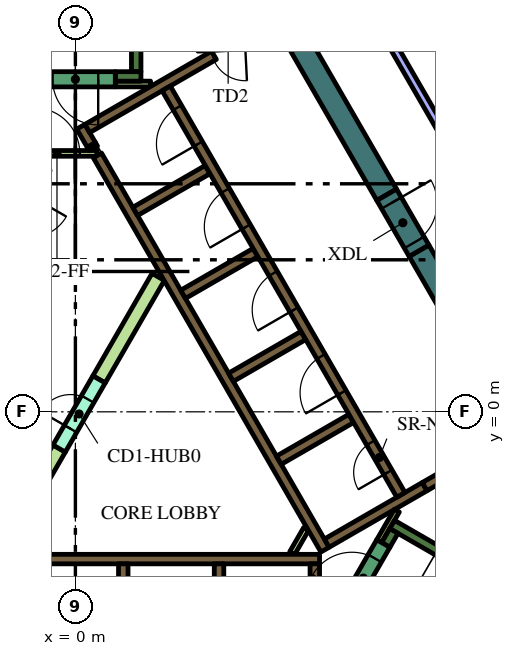
"""IFC4 building model, lengths in metres.
Left out: names, types, materials, properties, quantities, classifications, styles, units other than length and angle.
Written with IfcOpenShell. Run it as: python <this file> out.ifc"""

import sys

from ifc_helpers import new_model, si_unit, direction, frame, frame_2d, origin, place, context, subcontext, project, spatial, polyline, rectangle, outline, extrude, element, fill, save


model = new_model("IFC4")
c1 = context("Model", 3, precision=1e-05, world=origin(), true_north=direction((0.0, 1.0)))
c2 = subcontext(c1, "Body", "Model", "MODEL_VIEW")
j1 = project(units=[si_unit("LENGTHUNIT", "METRE"), si_unit("PLANEANGLEUNIT", "RADIAN")], contexts=[c1])
p1 = place(None, origin())
s1 = spatial("IfcSite", under=j1, at=p1, CompositionType="ELEMENT")
p2 = place(p1, origin())
s2 = spatial("IfcBuilding", under=s1, at=p2, CompositionType="ELEMENT")
p3 = place(p2, frame((0.0, 0.0, 267.0)))
s3 = spatial("IfcBuildingStorey", under=s2, at=p3, CompositionType="ELEMENT", Elevation=267.0)
p4 = place(p3, frame((9.042, 4.239, 0.0), z_axis=(0.0, 0.0, 1.0), x_axis=(0.500005785455, -0.866022063525, 0.0)))
e1 = element("IfcWall", 1, at=p4, inside=s3, PredefinedType="SOLIDWALL", context=c2, shape_type="SweptSolid", body=[
    extrude(rectangle(XDim=12.406, YDim=0.6, at=frame_2d((6.203, 0.0))), origin(), (0.0, 0.0, 1.0), 4.2),
])
p5 = place(p3, frame((5.928, 9.633, 0.0), z_axis=(0.0, 0.0, 1.0), x_axis=(0.499983823482, -0.8660347431, 0.0)))
e2 = element("IfcWall", 2, at=p5, inside=s3, PredefinedType="SOLIDWALL", context=c2, shape_type="SweptSolid", body=[
    extrude(rectangle(XDim=4.528, YDim=0.6, at=frame_2d((2.264, 0.0))), origin(), (0.0, 0.0, 1.0), 4.2),
])
p6 = place(p3, frame((8.334, -2.964, 0.0), z_axis=(0.0, 0.0, 1.0), x_axis=(0.866016039709, -0.500016218704, 0.0)))
e3 = element("IfcWall", 3, at=p6, inside=s3, PredefinedType="SOLIDWALL", context=c2, shape_type="SweptSolid", body=[
    extrude(rectangle(XDim=7.05, YDim=0.25, at=frame_2d((3.525, 0.0))), origin(), (0.0, 0.0, 1.0), 4.2),
])
p7 = place(p3, frame((8.168, -3.503, 0.0), z_axis=(0.0, 0.0, 1.0), x_axis=(0.49972245349, 0.866185586049, 0.0)))
e4 = element("IfcWall", 4, at=p7, inside=s3, PredefinedType="SOLIDWALL", context=c2, shape_type="SweptSolid", body=[
    extrude(rectangle(XDim=0.425, YDim=0.25, at=frame_2d((0.212, 0.0))), origin(), (0.0, 0.0, 1.0), 4.2),
])
p8 = place(p3, frame((1.6, 8.95, 0.0), z_axis=(0.0, 0.0, 1.0), x_axis=(0.0, 1.0, 0.0)))
e5 = element("IfcWall", 5, at=p8, inside=s3, PredefinedType="SOLIDWALL", context=c2, shape_type="SweptSolid", body=[
    extrude(rectangle(XDim=6.8, YDim=0.25, at=frame_2d((3.4, 0.0))), origin(), (0.0, 0.0, 1.0), 4.2),
])
p9 = place(p3, frame((1.05, 8.825, 0.0), z_axis=(0.0, 0.0, 1.0), x_axis=(1.0, 0.0, 0.0)))
e6 = element("IfcWall", 6, at=p9, inside=s3, PredefinedType="SOLIDWALL", context=c2, shape_type="SweptSolid", body=[
    extrude(rectangle(XDim=0.675, YDim=0.25, at=frame_2d((0.337, 0.0))), origin(), (0.0, 0.0, 1.0), 4.2),
])
p10 = place(p3, frame((-5.545, -3.875, 0.0), z_axis=(0.0, 0.0, 1.0), x_axis=(1.0, 0.0, 0.0)))
e7 = element("IfcWall", 7, at=p10, inside=s3, PredefinedType="SOLIDWALL", context=c2, shape_type="SweptSolid", body=[
    extrude(rectangle(XDim=11.97, YDim=0.25, at=frame_2d((5.985, 0.0))), origin(), (0.0, 0.0, 1.0), 4.2),
])
p11 = place(p3, frame((6.3, -7.24, 0.0), z_axis=(0.0, 0.0, 1.0), x_axis=(0.0, 1.0, 0.0)))
e8 = element("IfcWall", 8, at=p11, inside=s3, PredefinedType="SOLIDWALL", context=c2, shape_type="SweptSolid", body=[
    extrude(rectangle(XDim=3.24, YDim=0.25, at=frame_2d((1.62, 0.0))), origin(), (0.0, 0.0, 1.0), 4.2),
])
for number, where, z_axis, x_axis in (
    (9, (3.78, -4.0, 0.0), (0.0, 0.0, 1.0), (0.0, -1.0, 0.0)),
    (10, (1.26, -4.0, 0.0), (0.0, 0.0, 1.0), (0.0, -1.0, 0.0)),
):
    element("IfcWall", number, at=place(p3, frame(where, z_axis=z_axis, x_axis=x_axis)), inside=s3, PredefinedType="SOLIDWALL", context=c2, shape_type="SweptSolid", body=[
        extrude(rectangle(XDim=2.2, YDim=0.25, at=frame_2d((1.1, 0.0))), origin(), (0.0, 0.0, 1.0), 4.2),
    ])
p12 = place(p3, frame((0.473, 6.93, 0.0), z_axis=(0.0, 0.0, 1.0), x_axis=(-0.49972245349, 0.866185586049, 0.0)))
e11 = element("IfcWall", 11, at=p12, inside=s3, PredefinedType="SOLIDWALL", context=c2, shape_type="SweptSolid", body=[
    extrude(rectangle(XDim=0.11, YDim=0.25, at=frame_2d((0.055, 0.0))), origin(), (0.0, 0.0, 1.0), 4.2),
])
p13 = place(p3, frame((6.568, -3.627, 0.0), z_axis=(0.0, 0.0, 1.0), x_axis=(-0.499999455981, 0.866025717874, 0.0)))
e12 = element("IfcWall", 12, at=p13, inside=s3, PredefinedType="SOLIDWALL", context=c2, shape_type="SweptSolid", body=[
    extrude(rectangle(XDim=11.978, YDim=0.25, at=frame_2d((5.989, 0.0))), origin(), (0.0, 0.0, 1.0), 4.2),
])
p14 = place(p3, frame((0.417, 7.027, 0.0), z_axis=(0.0, 0.0, 1.0), x_axis=(-0.500210807569, 0.865903659763, 0.0)))
e13 = element("IfcWall", 13, at=p14, inside=s3, PredefinedType="SOLIDWALL", context=c2, shape_type="SweptSolid", body=[
    extrude(rectangle(XDim=0.548, YDim=0.25, at=frame_2d((0.274, 0.0))), origin(), (0.0, 0.0, 1.0), 4.2),
])
p15 = place(p3, frame((3.647, 9.38, 0.0), z_axis=(0.0, 0.0, 1.0), x_axis=(-0.866025015791, -0.500000672024, 0.0)))
e14 = element("IfcWall", 14, at=p15, inside=s3, PredefinedType="SOLIDWALL", context=c2, shape_type="SweptSolid", body=[
    extrude(rectangle(XDim=3.849, YDim=0.25, at=frame_2d((1.924, 0.0))), origin(), (0.0, 0.0, 1.0), 4.2),
])
p16 = place(p3, frame((1.574, 5.274, 0.0), z_axis=(0.0, 0.0, 1.0), x_axis=(0.866028486751, 0.499994660107, 0.0)))
e15 = element("IfcWall", 15, at=p16, inside=s3, PredefinedType="SOLIDWALL", context=c2, shape_type="SweptSolid", body=[
    extrude(rectangle(XDim=2.2, YDim=0.25, at=frame_2d((1.1, 0.0))), origin(), (0.0, 0.0, 1.0), 4.2),
])
for number, where, z_axis, x_axis in (
    (16, (2.834, 3.091, 0.0), (0.0, 0.0, 1.0), (0.866, 0.5, 0.0)),
    (17, (4.094, 0.909, 0.0), (0.0, 0.0, 1.0), (0.866, 0.5, 0.0)),
    (18, (5.354, -1.274, 0.0), (0.0, 0.0, 1.0), (0.866, 0.5, 0.0)),
):
    element("IfcWall", number, at=place(p3, frame(where, z_axis=z_axis, x_axis=x_axis)), inside=s3, PredefinedType="SOLIDWALL", context=c2, shape_type="SweptSolid", body=[
        extrude(rectangle(XDim=2.2, YDim=0.25, at=frame_2d((1.1, 0.0))), origin(), (0.0, 0.0, 1.0), 4.2),
    ])
p17 = place(p3, frame((6.614, -3.456, 0.0), z_axis=(0.0, 0.0, 1.0), x_axis=(0.866032512851, 0.499987686533, 0.0)))
e19 = element("IfcWall", 19, at=p17, inside=s3, PredefinedType="SOLIDWALL", context=c2, shape_type="SweptSolid", body=[
    extrude(rectangle(XDim=2.975, YDim=0.25, at=frame_2d((1.487, 0.0))), origin(), (0.0, 0.0, 1.0), 4.2),
])
p18 = place(p3, frame((1.05, 8.625, 0.0), z_axis=(0.0, 0.0, 1.0), x_axis=(1.0, 0.0, 0.0)))
e20 = element("IfcWall", 20, at=p18, inside=s3, PredefinedType="PARTITIONING", context=c2, shape_type="SweptSolid", body=[
    extrude(rectangle(XDim=0.929, YDim=0.15, at=frame_2d((0.464, 0.0))), origin(), (0.0, 0.0, 1.0), 3.55),
])
p19 = place(p3, frame((8.459, -2.599, 0.0), z_axis=(0.0, 0.0, 1.0), x_axis=(-0.500041054325, -0.866001699761, 0.0)))
e21 = element("IfcWall", 21, at=p19, inside=s3, PredefinedType="PARTITIONING", context=c2, shape_type="SweptSolid", body=[
    extrude(rectangle(XDim=0.929, YDim=0.15, at=frame_2d((0.464, 0.0))), origin(), (0.0, 0.0, 1.0), 4.2),
])
p20 = place(p3, frame((5.705, -3.718, 0.0), z_axis=(0.0, 0.0, 1.0), x_axis=(0.499962090823, 0.866047289552, 0.0)))
e22 = element("IfcWall", 22, at=p20, inside=s3, PredefinedType="PARTITIONING", context=c2, shape_type="SweptSolid", body=[
    extrude(rectangle(XDim=0.735, YDim=0.15, at=frame_2d((0.367, 0.0))), origin(), (0.0, 0.0, 1.0), 3.55),
])
p21 = place(p3, origin())
e23 = element("IfcWall", 23, at=p21, inside=s3, PredefinedType="PARTITIONING", context=c2, shape_type="SweptSolid", body=[
    extrude(outline(polyline([(2.017, 3.643), (2.342, 3.456), (0.785, 0.76), (0.46, 0.947), (2.017, 3.643)])), origin(), (0.0, 0.0, 1.0), 3.55),
])
e24 = element("IfcWall", 24, at=p21, inside=s3, PredefinedType="PARTITIONING", context=c2, shape_type="SweptSolid", body=[
    extrude(outline(polyline([(-0.59, -0.872), (-0.265, -1.059), (-1.822, -3.756), (-2.147, -3.568), (-0.59, -0.872)])), origin(), (0.0, 0.0, 1.0), 3.55),
])
p22 = place(p3, frame((8.565, -2.185, 0.0), z_axis=(0.0, 0.0, 1.0), x_axis=(-0.499997954832, 0.866026584559, 0.0)))
e25 = element("IfcWall", 25, at=p22, inside=s3, PredefinedType="SOLIDWALL", context=c2, shape_type="SweptSolid", body=[
    extrude(rectangle(XDim=12.35, YDim=0.25, at=frame_2d((6.175, 0.0))), origin(), (0.0, 0.0, 1.0), 4.2),
])
p23 = place(p22, frame((0.685, 0.0, 0.0)))
e26 = element("IfcOpeningElement", 26, at=p23, cuts=e25, PredefinedType="OPENING", context=c2, shape_type="SweptSolid", body=[
    extrude(rectangle(XDim=0.9, YDim=2.1, at=frame_2d((0.45, 1.05))), frame((0.0, 0.135, 0.0), z_axis=(0.0, -1.0, 0.0), x_axis=(1.0, 0.0, 0.0)), (0.0, 0.0, 1.0), 0.27),
])
p24 = place(p22, frame((3.105, 0.0, 0.0)))
e27 = element("IfcOpeningElement", 27, at=p24, cuts=e25, PredefinedType="OPENING", context=c2, shape_type="SweptSolid", body=[
    extrude(rectangle(XDim=1.1, YDim=2.1, at=frame_2d((0.55, 1.05))), frame((0.0, 0.135, 0.0), z_axis=(0.0, -1.0, 0.0), x_axis=(1.0, 0.0, 0.0)), (0.0, 0.0, 1.0), 0.27),
])
p25 = place(p22, frame((5.625, 0.0, 0.0)))
e28 = element("IfcOpeningElement", 28, at=p25, cuts=e25, PredefinedType="OPENING", context=c2, shape_type="SweptSolid", body=[
    extrude(rectangle(XDim=1.1, YDim=2.1, at=frame_2d((0.55, 1.05))), frame((0.0, 0.135, 0.0), z_axis=(0.0, -1.0, 0.0), x_axis=(1.0, 0.0, 0.0)), (0.0, 0.0, 1.0), 0.27),
])
p26 = place(p22, frame((8.145, 0.0, 0.0)))
e29 = element("IfcOpeningElement", 29, at=p26, cuts=e25, PredefinedType="OPENING", context=c2, shape_type="SweptSolid", body=[
    extrude(rectangle(XDim=1.1, YDim=2.1, at=frame_2d((0.55, 1.05))), frame((0.0, 0.135, 0.0), z_axis=(0.0, -1.0, 0.0), x_axis=(1.0, 0.0, 0.0)), (0.0, 0.0, 1.0), 0.27),
])
p27 = place(p22, frame((10.665, 0.0, 0.0)))
e30 = element("IfcOpeningElement", 30, at=p27, cuts=e25, PredefinedType="OPENING", context=c2, shape_type="SweptSolid", body=[
    extrude(rectangle(XDim=1.1, YDim=2.1, at=frame_2d((0.55, 1.05))), frame((0.0, 0.135, 0.0), z_axis=(0.0, -1.0, 0.0), x_axis=(1.0, 0.0, 0.0)), (0.0, 0.0, 1.0), 0.27),
])
p28 = place(p3, frame((7.053, -5.284, 0.0), z_axis=(0.0, 0.0, 1.0), x_axis=(0.500078061341, 0.865980330357, 0.0)))
e31 = element("IfcWall", 31, at=p28, inside=s3, PredefinedType="SOLIDWALL", context=c2, shape_type="SweptSolid", body=[
    extrude(rectangle(XDim=2.1, YDim=0.4, at=frame_2d((1.05, 0.0))), origin(), (0.0, 0.0, 1.0), 4.2),
])
p29 = place(p28, frame((0.45, 0.0, 0.0)))
e32 = element("IfcOpeningElement", 32, at=p29, cuts=e31, PredefinedType="OPENING", context=c2, shape_type="SweptSolid", body=[
    extrude(rectangle(XDim=1.2, YDim=2.1, at=frame_2d((0.6, 1.05))), frame((0.0, 0.21, 0.0), z_axis=(0.0, -1.0, 0.0), x_axis=(1.0, 0.0, 0.0)), (0.0, 0.0, 1.0), 0.42),
])
p30 = place(p3, frame((1.05, 8.75, 0.0), z_axis=(0.0, 0.0, 1.0), x_axis=(-1.0, 0.0, 0.0)))
e33 = element("IfcWall", 33, at=p30, inside=s3, PredefinedType="SOLIDWALL", context=c2, shape_type="SweptSolid", body=[
    extrude(rectangle(XDim=2.1, YDim=0.4, at=frame_2d((1.05, 0.0))), origin(), (0.0, 0.0, 1.0), 4.2),
])
p31 = place(p30, frame((0.45, 0.0, 0.0)))
e34 = element("IfcOpeningElement", 34, at=p31, cuts=e33, PredefinedType="OPENING", context=c2, shape_type="SweptSolid", body=[
    extrude(rectangle(XDim=1.2, YDim=2.1, at=frame_2d((0.6, 1.05))), frame((0.0, 0.21, 0.0), z_axis=(0.0, -1.0, 0.0), x_axis=(1.0, 0.0, 0.0)), (0.0, 0.0, 1.0), 0.42),
])
p32 = place(p3, frame((-0.427, -0.966, 0.0), z_axis=(0.0, 0.0, 1.0), x_axis=(0.49994051562, 0.866059744384, 0.0)))
e35 = element("IfcWall", 35, at=p32, inside=s3, PredefinedType="PARTITIONING", context=c2, shape_type="SweptSolid", body=[
    extrude(rectangle(XDim=2.1, YDim=0.375, at=frame_2d((1.05, 0.0))), origin(), (0.0, 0.0, 1.0), 3.55),
])
p33 = place(p32, frame((0.6, 0.0, 0.0)))
e36 = element("IfcOpeningElement", 36, at=p33, cuts=e35, PredefinedType="OPENING", context=c2, shape_type="SweptSolid", body=[
    extrude(rectangle(XDim=0.9, YDim=2.1, at=frame_2d((0.45, 1.05))), frame((0.0, 0.198, 0.0), z_axis=(0.0, -1.0, 0.0), x_axis=(1.0, 0.0, 0.0)), (0.0, 0.0, 1.0), 0.395),
])
p34 = place(p3, frame((-1.534, 6.8, 0.0), z_axis=(0.0, 0.0, 1.0), x_axis=(1.0, 0.0, 0.0)))
e37 = element("IfcWall", 37, at=p34, inside=s3, PredefinedType="PARTITIONING", context=c2, shape_type="SweptSolid", body=[
    extrude(rectangle(XDim=2.1, YDim=0.15, at=frame_2d((1.05, 0.0))), origin(), (0.0, 0.0, 1.0), 3.55),
])
p35 = place(p34, frame((0.45, 0.0, 0.0)))
e38 = element("IfcOpeningElement", 38, at=p35, cuts=e37, PredefinedType="OPENING", context=c2, shape_type="SweptSolid", body=[
    extrude(rectangle(XDim=1.2, YDim=2.1, at=frame_2d((0.6, 1.05))), frame((0.0, 0.085, 0.0), z_axis=(0.0, -1.0, 0.0), x_axis=(1.0, 0.0, 0.0)), (0.0, 0.0, 1.0), 0.17),
])
p36 = place(p3, frame((11.009, -0.919, 0.0), z_axis=(0.0, 0.0, 1.0), x_axis=(-0.866059744384, -0.49994051562, 0.0)))
e39 = element("IfcWall", 39, at=p36, inside=s3, PredefinedType="SOLIDWALL", context=c2, shape_type="SweptSolid", body=[
    extrude(rectangle(XDim=2.1, YDim=0.25, at=frame_2d((1.05, 0.0))), origin(), (0.0, 0.0, 1.0), 4.2),
])
p37 = place(p36, frame((0.45, 0.0, 0.0)))
e40 = element("IfcOpeningElement", 40, at=p37, cuts=e39, PredefinedType="OPENING", context=c2, shape_type="SweptSolid", body=[
    extrude(rectangle(XDim=1.2, YDim=2.1, at=frame_2d((0.6, 1.05))), frame((0.0, 0.135, 0.0), z_axis=(0.0, -1.0, 0.0), x_axis=(1.0, 0.0, 0.0)), (0.0, 0.0, 1.0), 0.27),
])
p38 = place(p3, frame((8.192, 5.711, 0.0), z_axis=(0.0, 0.0, 1.0), x_axis=(0.500062241894, -0.865989465428, 0.0)))
e41 = element("IfcWall", 41, at=p38, inside=s3, PredefinedType="SOLIDWALL", context=c2, shape_type="SweptSolid", body=[
    extrude(rectangle(XDim=1.7, YDim=0.6, at=frame_2d((0.85, 0.0))), origin(), (0.0, 0.0, 1.0), 4.2),
])
p39 = place(p38, frame((0.25, 0.0, 0.0)))
e42 = element("IfcOpeningElement", 42, at=p39, cuts=e41, PredefinedType="OPENING", context=c2, shape_type="SweptSolid", body=[
    extrude(rectangle(XDim=1.2, YDim=2.1, at=frame_2d((0.6, 1.05))), frame((0.0, 0.31, 0.0), z_axis=(0.0, -1.0, 0.0), x_axis=(1.0, 0.0, 0.0)), (0.0, 0.0, 1.0), 0.62),
])
p40 = place(p3, frame((13.436, 0.829, 0.0), z_axis=(0.0, 0.0, 1.0), x_axis=(-0.49999894854, 0.866026010844, 0.0)))
e43 = element("IfcWall", 43, at=p40, inside=s3, PredefinedType="PARTITIONING", context=c2, shape_type="SweptSolid", body=[
    extrude(rectangle(XDim=12.0, YDim=0.2, at=frame_2d((6.0, 0.0))), origin(), (0.0, 0.0, 1.0), 3.55),
])
p41 = place(p40, frame((5.5, 0.0, 0.0)))
e44 = element("IfcOpeningElement", 44, at=p41, cuts=e43, PredefinedType="OPENING", context=c2, shape_type="SweptSolid", body=[
    extrude(rectangle(XDim=1.0, YDim=2.1, at=frame_2d((0.5, 1.05))), frame((0.0, 0.11, 0.0), z_axis=(0.0, -1.0, 0.0), x_axis=(1.0, 0.0, 0.0)), (0.0, 0.0, 1.0), 0.22),
])
p42 = place(p23, origin())
e45 = element("IfcDoor", 45, at=p42, inside=s3, OperationType="SINGLE_SWING_LEFT", PredefinedType="DOOR", context=c2, shape_type="SweptSolid", body=[
    extrude(rectangle(XDim=0.9, YDim=2.1, at=frame_2d((0.45, 1.05))), frame((0.0, 0.025, 0.0), z_axis=(0.0, -1.0, 0.0), x_axis=(1.0, 0.0, 0.0)), (0.0, 0.0, 1.0), 0.05),
])
fill(e26, e45)
p43 = place(p24, origin())
e46 = element("IfcDoor", 46, at=p43, inside=s3, OperationType="DOUBLE_DOOR_SLIDING", PredefinedType="DOOR", context=c2, shape_type="SweptSolid", body=[
    extrude(rectangle(XDim=1.1, YDim=2.1, at=frame_2d((0.55, 1.05))), frame((0.0, 0.025, 0.0), z_axis=(0.0, -1.0, 0.0), x_axis=(1.0, 0.0, 0.0)), (0.0, 0.0, 1.0), 0.05),
])
fill(e27, e46)
p44 = place(p25, origin())
e47 = element("IfcDoor", 47, at=p44, inside=s3, OperationType="DOUBLE_DOOR_SLIDING", PredefinedType="DOOR", context=c2, shape_type="SweptSolid", body=[
    extrude(rectangle(XDim=1.1, YDim=2.1, at=frame_2d((0.55, 1.05))), frame((0.0, 0.025, 0.0), z_axis=(0.0, -1.0, 0.0), x_axis=(1.0, 0.0, 0.0)), (0.0, 0.0, 1.0), 0.05),
])
fill(e28, e47)
p45 = place(p26, origin())
e48 = element("IfcDoor", 48, at=p45, inside=s3, OperationType="DOUBLE_DOOR_SLIDING", PredefinedType="DOOR", context=c2, shape_type="SweptSolid", body=[
    extrude(rectangle(XDim=1.1, YDim=2.1, at=frame_2d((0.55, 1.05))), frame((0.0, 0.025, 0.0), z_axis=(0.0, -1.0, 0.0), x_axis=(1.0, 0.0, 0.0)), (0.0, 0.0, 1.0), 0.05),
])
fill(e29, e48)
p46 = place(p27, origin())
e49 = element("IfcDoor", 49, at=p46, inside=s3, OperationType="DOUBLE_DOOR_SLIDING", PredefinedType="DOOR", context=c2, shape_type="SweptSolid", body=[
    extrude(rectangle(XDim=1.1, YDim=2.1, at=frame_2d((0.55, 1.05))), frame((0.0, 0.025, 0.0), z_axis=(0.0, -1.0, 0.0), x_axis=(1.0, 0.0, 0.0)), (0.0, 0.0, 1.0), 0.05),
])
fill(e30, e49)
p47 = place(p29, origin())
e50 = element("IfcDoor", 50, at=p47, inside=s3, OperationType="SINGLE_SWING_LEFT", PredefinedType="DOOR", context=c2, shape_type="SweptSolid", body=[
    extrude(rectangle(XDim=1.2, YDim=2.1, at=frame_2d((0.6, 1.05))), frame((0.0, 0.025, 0.0), z_axis=(0.0, -1.0, 0.0), x_axis=(1.0, 0.0, 0.0)), (0.0, 0.0, 1.0), 0.05),
])
fill(e32, e50)
p48 = place(p31, origin())
e51 = element("IfcDoor", 51, at=p48, inside=s3, OperationType="SINGLE_SWING_LEFT", PredefinedType="DOOR", context=c2, shape_type="SweptSolid", body=[
    extrude(rectangle(XDim=1.2, YDim=2.1, at=frame_2d((0.6, 1.05))), frame((0.0, 0.025, 0.0), z_axis=(0.0, -1.0, 0.0), x_axis=(1.0, 0.0, 0.0)), (0.0, 0.0, 1.0), 0.05),
])
fill(e34, e51)
p49 = place(p33, origin())
e52 = element("IfcDoor", 52, at=p49, inside=s3, OperationType="SINGLE_SWING_LEFT", PredefinedType="DOOR", context=c2, shape_type="SweptSolid", body=[
    extrude(rectangle(XDim=0.9, YDim=2.1, at=frame_2d((0.45, 1.05))), frame((0.0, 0.025, 0.0), z_axis=(0.0, -1.0, 0.0), x_axis=(1.0, 0.0, 0.0)), (0.0, 0.0, 1.0), 0.05),
])
fill(e36, e52)
p50 = place(p35, origin())
e53 = element("IfcDoor", 53, at=p50, inside=s3, OperationType="SINGLE_SWING_LEFT", PredefinedType="DOOR", context=c2, shape_type="SweptSolid", body=[
    extrude(rectangle(XDim=1.2, YDim=2.1, at=frame_2d((0.6, 1.05))), frame((0.0, 0.025, 0.0), z_axis=(0.0, -1.0, 0.0), x_axis=(1.0, 0.0, 0.0)), (0.0, 0.0, 1.0), 0.05),
])
fill(e38, e53)
p51 = place(p39, origin())
e54 = element("IfcDoor", 54, at=p51, inside=s3, OperationType="SINGLE_SWING_LEFT", PredefinedType="DOOR", context=c2, shape_type="SweptSolid", body=[
    extrude(rectangle(XDim=1.2, YDim=2.1, at=frame_2d((0.6, 1.05))), frame((0.0, 0.025, 0.0), z_axis=(0.0, -1.0, 0.0), x_axis=(1.0, 0.0, 0.0)), (0.0, 0.0, 1.0), 0.05),
])
fill(e42, e54)
save(model, sys.argv[1])
